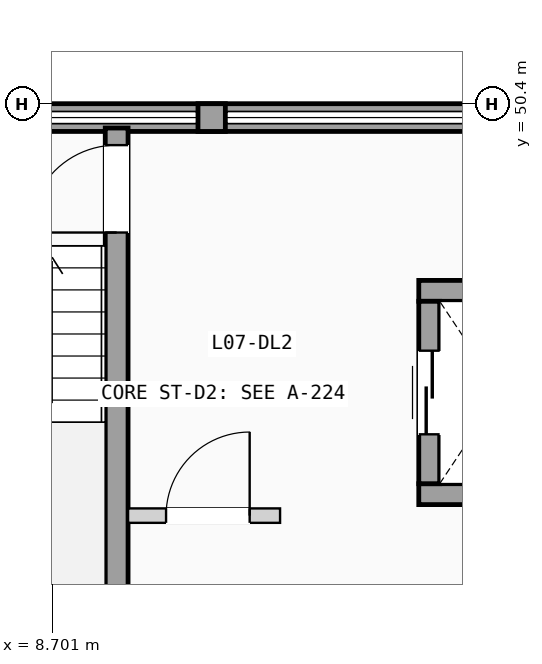
"""IFC4 building model, lengths in metres.
Left out: names, types, materials, properties, quantities, classifications, styles, units other than length and angle.
Written with IfcOpenShell. Run it as: python <this file> out.ifc"""

import sys

from ifc_helpers import new_model, si_unit, direction, frame, frame_2d, origin, place, context, subcontext, project, spatial, rectangle, extrude, element, fill, save


model = new_model("IFC4")
c1 = context("Model", 3, precision=1e-05, world=origin(), true_north=direction((0.0, 1.0)))
c2 = subcontext(c1, "Body", "Model", "MODEL_VIEW")
j1 = project(units=[si_unit("LENGTHUNIT", "METRE"), si_unit("PLANEANGLEUNIT", "RADIAN")], contexts=[c1])
p1 = place(None, origin())
s1 = spatial("IfcSite", under=j1, at=p1, CompositionType="ELEMENT")
p2 = place(p1, origin())
s2 = spatial("IfcBuilding", under=s1, at=p2, CompositionType="ELEMENT")
p3 = place(p2, frame((0.0, 0.0, 24.675)))
s3 = spatial("IfcBuildingStorey", under=s2, at=p3, CompositionType="ELEMENT", Elevation=24.675)
p4 = place(p3, frame((0.0, 50.218, 0.0), z_axis=(0.0, 0.0, 1.0), x_axis=(1.0, 0.0, 0.0)))
e1 = element("IfcWall", 1, at=p4, inside=s3, PredefinedType="SOLIDWALL", context=c2, shape_type="SweptSolid", body=[
    extrude(rectangle(XDim=21.6, YDim=0.365, at=frame_2d((10.8, 0.0))), origin(), (0.0, 0.0, 1.0), 1.11),
])
p5 = place(p3, frame((10.62, 50.218, 1.11), z_axis=(0.0, 0.0, 1.0), x_axis=(1.0, 0.0, 0.0)))
e2 = element("IfcWall", 2, at=p5, inside=s3, PredefinedType="SOLIDWALL", context=c2, shape_type="SweptSolid", body=[
    extrude(rectangle(XDim=0.36, YDim=0.365, at=frame_2d((0.18, 0.0))), origin(), (0.0, 0.0, 1.0), 1.49),
])
p6 = place(p3, frame((9.55, 43.08, 0.0), z_axis=(0.0, 0.0, 1.0), x_axis=(0.0, 1.0, 0.0)))
e3 = element("IfcWall", 3, at=p6, inside=s3, PredefinedType="SHEAR", context=c2, shape_type="SweptSolid", body=[
    extrude(rectangle(XDim=7.0, YDim=0.3, at=frame_2d((3.5, 0.0))), origin(), (0.0, 0.0, 1.0), 2.9),
])
p7 = place(p6, frame((5.625, 0.0, 0.0)))
e4 = element("IfcOpeningElement", 4, at=p7, cuts=e3, PredefinedType="OPENING", context=c2, shape_type="SweptSolid", body=[
    extrude(rectangle(XDim=1.15, YDim=2.12, at=frame_2d((0.575, 1.06))), frame((0.0, 0.16, 0.0), z_axis=(0.0, -1.0, 0.0), x_axis=(1.0, 0.0, 0.0)), (0.0, 0.0, 1.0), 0.32),
])
for number, where, z_axis, x_axis in (
    (5, (13.525, 45.262, 0.0), (0.0, 0.0, 1.0), (1.0, 0.0, 0.0)),
    (6, (13.525, 47.938, 0.0), (0.0, 0.0, 1.0), (1.0, 0.0, 0.0)),
):
    element("IfcWall", number, at=place(p3, frame(where, z_axis=z_axis, x_axis=x_axis)), inside=s3, PredefinedType="SHEAR", context=c2, shape_type="SweptSolid", body=[
        extrude(rectangle(XDim=2.15, YDim=0.275, at=frame_2d((1.075, 0.0))), origin(), (0.0, 0.0, 1.0), 2.9),
    ])
p8 = place(p3, frame((13.663, 45.4, 0.0), z_axis=(0.0, 0.0, 1.0), x_axis=(0.0, 1.0, 0.0)))
e7 = element("IfcWall", 7, at=p8, inside=s3, PredefinedType="SHEAR", context=c2, shape_type="SweptSolid", body=[
    extrude(rectangle(XDim=2.4, YDim=0.275, at=frame_2d((1.2, 0.0))), origin(), (0.0, 0.0, 1.0), 2.9),
])
p9 = place(p8, frame((0.65, 0.0, 0.0)))
e8 = element("IfcOpeningElement", 8, at=p9, cuts=e7, PredefinedType="OPENING", context=c2, shape_type="SweptSolid", body=[
    extrude(rectangle(XDim=1.1, YDim=2.15, at=frame_2d((0.55, 1.075))), frame((0.0, 0.147, 0.0), z_axis=(0.0, -1.0, 0.0), x_axis=(1.0, 0.0, 0.0)), (0.0, 0.0, 1.0), 0.295),
])
p10 = place(p3, frame((9.7, 44.98, 0.0), z_axis=(0.0, 0.0, 1.0), x_axis=(1.0, 0.0, 0.0)))
e9 = element("IfcWall", 9, at=p10, inside=s3, PredefinedType="PARTITIONING", context=c2, shape_type="SweptSolid", body=[
    extrude(rectangle(XDim=2.0, YDim=0.19, at=frame_2d((1.0, 0.0))), origin(), (0.0, 0.0, 1.0), 2.87),
])
p11 = place(p10, frame((0.5, 0.0, 0.0)))
e10 = element("IfcOpeningElement", 10, at=p11, cuts=e9, PredefinedType="OPENING", context=c2, shape_type="SweptSolid", body=[
    extrude(rectangle(XDim=1.1, YDim=2.12, at=frame_2d((0.55, 1.06))), frame((0.0, 0.105, 0.0), z_axis=(0.0, -1.0, 0.0), x_axis=(1.0, 0.0, 0.0)), (0.0, 0.0, 1.0), 0.21),
])
p12 = place(p7, origin())
e11 = element("IfcDoor", 11, at=p12, inside=s3, OperationType="SINGLE_SWING_LEFT", PredefinedType="DOOR", context=c2, shape_type="SweptSolid", body=[
    extrude(rectangle(XDim=1.15, YDim=2.12, at=frame_2d((0.575, 1.06))), frame((0.0, 0.025, 0.0), z_axis=(0.0, -1.0, 0.0), x_axis=(1.0, 0.0, 0.0)), (0.0, 0.0, 1.0), 0.05),
])
fill(e4, e11)
p13 = place(p9, origin())
e12 = element("IfcDoor", 12, at=p13, inside=s3, OperationType="SLIDING_TO_LEFT", PredefinedType="DOOR", context=c2, shape_type="SweptSolid", body=[
    extrude(rectangle(XDim=1.1, YDim=2.15, at=frame_2d((0.55, 1.075))), frame((0.0, 0.025, 0.0), z_axis=(0.0, -1.0, 0.0), x_axis=(1.0, 0.0, 0.0)), (0.0, 0.0, 1.0), 0.05),
])
fill(e8, e12)
p14 = place(p11, origin())
e13 = element("IfcDoor", 13, at=p14, inside=s3, OperationType="SINGLE_SWING_RIGHT", PredefinedType="DOOR", context=c2, shape_type="SweptSolid", body=[
    extrude(rectangle(XDim=1.1, YDim=2.12, at=frame_2d((0.55, 1.06))), frame((0.0, 0.025, 0.0), z_axis=(0.0, -1.0, 0.0), x_axis=(1.0, 0.0, 0.0)), (0.0, 0.0, 1.0), 0.05),
])
fill(e10, e13)
save(model, sys.argv[1])
